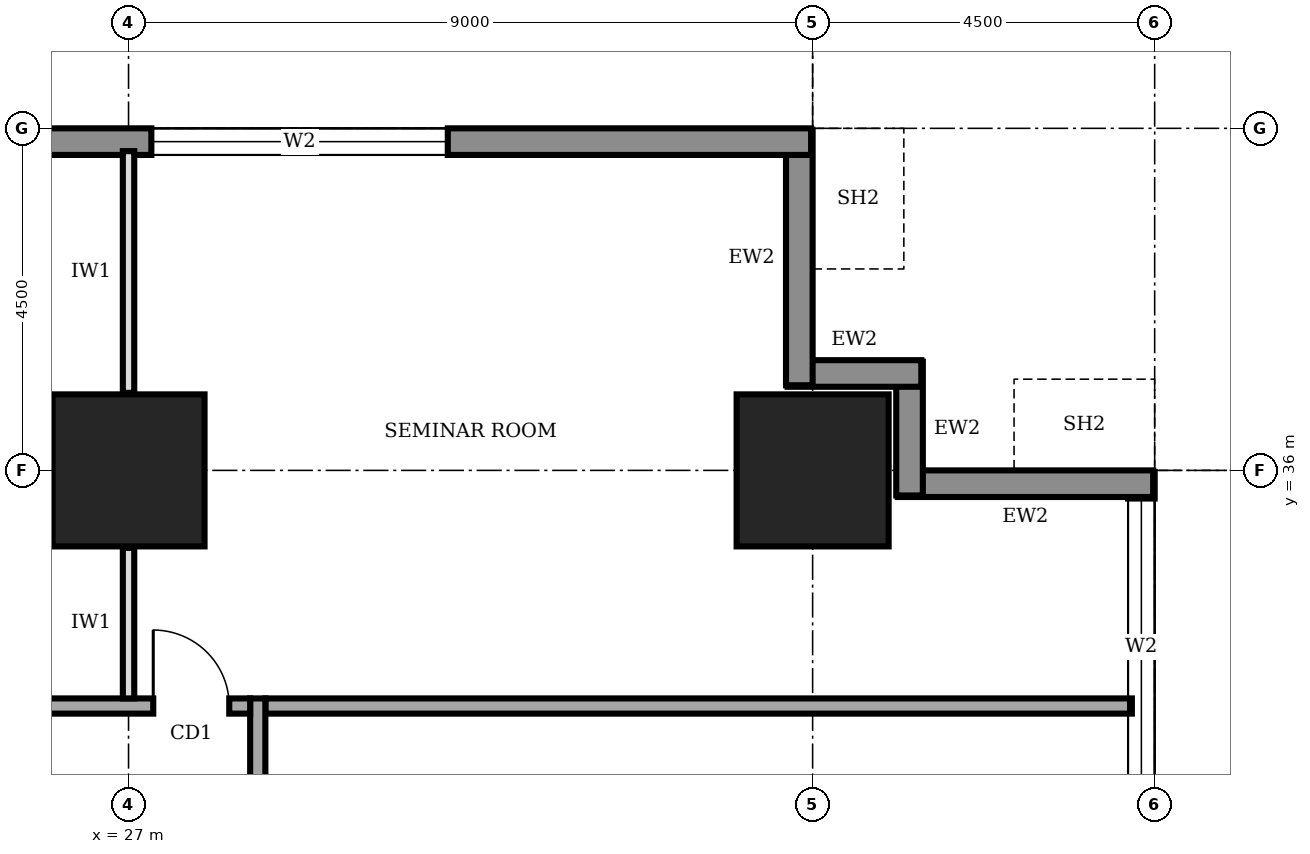
"""IFC4 building model, lengths in metres.
Left out: names, types, materials, properties, quantities, classifications, styles, units other than length and angle.
Written with IfcOpenShell. Run it as: python <this file> out.ifc"""

import sys

from ifc_helpers import new_model, si_unit, direction, frame, frame_2d, origin, origin_2d, place, context, subcontext, project, spatial, rectangle, extrude, element, fill, save


model = new_model("IFC4")
c1 = context("Model", 3, precision=1e-05, world=origin(), true_north=direction((0.0, 1.0)))
c2 = subcontext(c1, "Body", "Model", "MODEL_VIEW")
j1 = project(units=[si_unit("LENGTHUNIT", "METRE"), si_unit("PLANEANGLEUNIT", "RADIAN")], contexts=[c1])
p1 = place(None, origin())
s1 = spatial("IfcSite", under=j1, at=p1, CompositionType="ELEMENT")
p2 = place(p1, origin())
s2 = spatial("IfcBuilding", under=s1, at=p2, CompositionType="ELEMENT")
p3 = place(p2, frame((0.0, 0.0, 49.0)))
s3 = spatial("IfcBuildingStorey", under=s2, at=p3, CompositionType="ELEMENT", Elevation=49.0)
for number, where, z_axis, x_axis in (
    (1, (27.0, 36.0, 0.0), (0.0, 0.0, 1.0), (1.0, 0.0, 0.0)),
    (2, (36.0, 36.0, 0.0), (0.0, 0.0, 1.0), (1.0, 0.0, 0.0)),
):
    element("IfcColumn", number, at=place(p3, frame(where, z_axis=z_axis, x_axis=x_axis)), inside=s3, PredefinedType="COLUMN", context=c2, shape_type="SweptSolid", body=[
        extrude(rectangle(XDim=2.0, YDim=2.0, at=origin_2d()), origin(), (0.0, 0.0, 1.0), 4.0),
    ])
p4 = place(p3, frame((40.325, 4.52, 0.0), z_axis=(0.0, 0.0, 1.0), x_axis=(0.0, 1.0, 0.0)))
e3 = element("IfcWall", 3, at=p4, inside=s3, PredefinedType="STANDARD", context=c2, shape_type="SweptSolid", body=[
    extrude(rectangle(XDim=31.46, YDim=0.35, at=frame_2d((15.73, 0.0))), origin(), (0.0, 0.0, 1.0), 3.75),
])
p5 = place(p4, frame((4.78, 0.0, 0.6)))
e4 = element("IfcOpeningElement", 4, at=p5, cuts=e3, PredefinedType="OPENING", context=c2, shape_type="SweptSolid", body=[
    extrude(rectangle(XDim=3.9, YDim=2.6, at=frame_2d((1.95, 1.3))), frame((0.0, 0.185, 0.0), z_axis=(0.0, -1.0, 0.0), x_axis=(1.0, 0.0, 0.0)), (0.0, 0.0, 1.0), 0.37),
])
p6 = place(p4, frame((9.28, 0.0, 0.6)))
e5 = element("IfcOpeningElement", 5, at=p6, cuts=e3, PredefinedType="OPENING", context=c2, shape_type="SweptSolid", body=[
    extrude(rectangle(XDim=3.9, YDim=2.6, at=frame_2d((1.95, 1.3))), frame((0.0, 0.185, 0.0), z_axis=(0.0, -1.0, 0.0), x_axis=(1.0, 0.0, 0.0)), (0.0, 0.0, 1.0), 0.37),
])
p7 = place(p4, frame((13.78, 0.0, 0.6)))
e6 = element("IfcOpeningElement", 6, at=p7, cuts=e3, PredefinedType="OPENING", context=c2, shape_type="SweptSolid", body=[
    extrude(rectangle(XDim=3.9, YDim=2.6, at=frame_2d((1.95, 1.3))), frame((0.0, 0.185, 0.0), z_axis=(0.0, -1.0, 0.0), x_axis=(1.0, 0.0, 0.0)), (0.0, 0.0, 1.0), 0.37),
])
p8 = place(p4, frame((18.28, 0.0, 0.6)))
e7 = element("IfcOpeningElement", 7, at=p8, cuts=e3, PredefinedType="OPENING", context=c2, shape_type="SweptSolid", body=[
    extrude(rectangle(XDim=3.9, YDim=2.6, at=frame_2d((1.95, 1.3))), frame((0.0, 0.185, 0.0), z_axis=(0.0, -1.0, 0.0), x_axis=(1.0, 0.0, 0.0)), (0.0, 0.0, 1.0), 0.37),
])
p9 = place(p4, frame((22.78, 0.0, 0.6)))
e8 = element("IfcOpeningElement", 8, at=p9, cuts=e3, PredefinedType="OPENING", context=c2, shape_type="SweptSolid", body=[
    extrude(rectangle(XDim=3.9, YDim=2.6, at=frame_2d((1.95, 1.3))), frame((0.0, 0.185, 0.0), z_axis=(0.0, -1.0, 0.0), x_axis=(1.0, 0.0, 0.0)), (0.0, 0.0, 1.0), 0.37),
])
p10 = place(p4, frame((27.21, 0.0, 0.6)))
e9 = element("IfcOpeningElement", 9, at=p10, cuts=e3, PredefinedType="OPENING", context=c2, shape_type="SweptSolid", body=[
    extrude(rectangle(XDim=3.9, YDim=2.6, at=frame_2d((1.95, 1.3))), frame((0.0, 0.185, 0.0), z_axis=(0.0, -1.0, 0.0), x_axis=(1.0, 0.0, 0.0)), (0.0, 0.0, 1.0), 0.37),
])
p11 = place(p3, frame((40.48, 35.825, 0.0), z_axis=(0.0, 0.0, 1.0), x_axis=(-1.0, 0.0, 0.0)))
e10 = element("IfcWall", 10, at=p11, inside=s3, PredefinedType="STANDARD", context=c2, shape_type="SweptSolid", body=[
    extrude(rectangle(XDim=3.36, YDim=0.35, at=frame_2d((1.68, 0.0))), origin(), (0.0, 0.0, 1.0), 2.85),
])
for number, where, z_axis, x_axis in (
    (11, (37.275, 35.67, 0.0), (0.0, 0.0, 1.0), (0.0, 1.0, 0.0)),
    (12, (37.43, 37.275, 0.0), (0.0, 0.0, 1.0), (-1.0, 0.0, 0.0)),
):
    element("IfcWall", number, at=place(p3, frame(where, z_axis=z_axis, x_axis=x_axis)), inside=s3, PredefinedType="STANDARD", context=c2, shape_type="SweptSolid", body=[
        extrude(rectangle(XDim=1.76, YDim=0.35, at=frame_2d((0.88, 0.0))), origin(), (0.0, 0.0, 1.0), 3.75),
    ])
p12 = place(p3, frame((35.825, 37.12, 0.0), z_axis=(0.0, 0.0, 1.0), x_axis=(0.0, 1.0, 0.0)))
e13 = element("IfcWall", 13, at=p12, inside=s3, PredefinedType="STANDARD", context=c2, shape_type="SweptSolid", body=[
    extrude(rectangle(XDim=3.36, YDim=0.35, at=frame_2d((1.68, 0.0))), origin(), (0.0, 0.0, 1.0), 2.85),
])
p13 = place(p3, frame((35.98, 40.325, 0.0), z_axis=(0.0, 0.0, 1.0), x_axis=(-1.0, 0.0, 0.0)))
e14 = element("IfcWall", 14, at=p13, inside=s3, PredefinedType="STANDARD", context=c2, shape_type="SweptSolid", body=[
    extrude(rectangle(XDim=31.46, YDim=0.35, at=frame_2d((15.73, 0.0))), origin(), (0.0, 0.0, 1.0), 3.75),
])
p14 = place(p13, frame((27.21, 0.0, 0.6)))
e15 = element("IfcOpeningElement", 15, at=p14, cuts=e14, PredefinedType="OPENING", context=c2, shape_type="SweptSolid", body=[
    extrude(rectangle(XDim=3.9, YDim=2.6, at=frame_2d((1.95, 1.3))), frame((0.0, 0.185, 0.0), z_axis=(0.0, -1.0, 0.0), x_axis=(1.0, 0.0, 0.0)), (0.0, 0.0, 1.0), 0.37),
])
p15 = place(p13, frame((22.78, 0.0, 0.6)))
e16 = element("IfcOpeningElement", 16, at=p15, cuts=e14, PredefinedType="OPENING", context=c2, shape_type="SweptSolid", body=[
    extrude(rectangle(XDim=3.9, YDim=2.6, at=frame_2d((1.95, 1.3))), frame((0.0, 0.185, 0.0), z_axis=(0.0, -1.0, 0.0), x_axis=(1.0, 0.0, 0.0)), (0.0, 0.0, 1.0), 0.37),
])
p16 = place(p13, frame((4.78, 0.0, 0.6)))
e17 = element("IfcOpeningElement", 17, at=p16, cuts=e14, PredefinedType="OPENING", context=c2, shape_type="SweptSolid", body=[
    extrude(rectangle(XDim=3.9, YDim=2.6, at=frame_2d((1.95, 1.3))), frame((0.0, 0.185, 0.0), z_axis=(0.0, -1.0, 0.0), x_axis=(1.0, 0.0, 0.0)), (0.0, 0.0, 1.0), 0.37),
])
p17 = place(p3, frame((28.7, 9.2, 0.0), z_axis=(0.0, 0.0, 1.0), x_axis=(0.0, 1.0, 0.0)))
e18 = element("IfcWall", 18, at=p17, inside=s3, PredefinedType="SOLIDWALL", context=c2, shape_type="SweptSolid", body=[
    extrude(rectangle(XDim=23.8, YDim=0.2, at=frame_2d((11.9, 0.0))), origin(), (0.0, 0.0, 1.0), 3.75),
])
p18 = place(p17, frame((3.4, 0.0, 0.0)))
e19 = element("IfcOpeningElement", 19, at=p18, cuts=e18, PredefinedType="OPENING", context=c2, shape_type="SweptSolid", body=[
    extrude(rectangle(XDim=1.8, YDim=2.1, at=frame_2d((0.9, 1.05))), frame((0.0, 0.11, 0.0), z_axis=(0.0, -1.0, 0.0), x_axis=(1.0, 0.0, 0.0)), (0.0, 0.0, 1.0), 0.22),
])
p19 = place(p17, frame((10.55, 0.0, 0.0)))
e20 = element("IfcOpeningElement", 20, at=p19, cuts=e18, PredefinedType="OPENING", context=c2, shape_type="SweptSolid", body=[
    extrude(rectangle(XDim=1.0, YDim=2.1, at=frame_2d((0.5, 1.05))), frame((0.0, 0.11, 0.0), z_axis=(0.0, -1.0, 0.0), x_axis=(1.0, 0.0, 0.0)), (0.0, 0.0, 1.0), 0.22),
])
p20 = place(p17, frame((17.65, 0.0, 0.0)))
e21 = element("IfcOpeningElement", 21, at=p20, cuts=e18, PredefinedType="OPENING", context=c2, shape_type="SweptSolid", body=[
    extrude(rectangle(XDim=1.8, YDim=2.1, at=frame_2d((0.9, 1.05))), frame((0.0, 0.11, 0.0), z_axis=(0.0, -1.0, 0.0), x_axis=(1.0, 0.0, 0.0)), (0.0, 0.0, 1.0), 0.22),
])
p21 = place(p3, frame((28.6, 32.9, 0.0), z_axis=(0.0, 0.0, 1.0), x_axis=(-1.0, 0.0, 0.0)))
e22 = element("IfcWall", 22, at=p21, inside=s3, PredefinedType="SOLIDWALL", context=c2, shape_type="SweptSolid", body=[
    extrude(rectangle(XDim=16.9, YDim=0.2, at=frame_2d((8.45, 0.0))), origin(), (0.0, 0.0, 1.0), 3.75),
])
p22 = place(p21, frame((15.425, 0.0, 0.0)))
e23 = element("IfcOpeningElement", 23, at=p22, cuts=e22, PredefinedType="OPENING", context=c2, shape_type="SweptSolid", body=[
    extrude(rectangle(XDim=1.0, YDim=2.1, at=frame_2d((0.5, 1.05))), frame((0.0, 0.11, 0.0), z_axis=(0.0, -1.0, 0.0), x_axis=(1.0, 0.0, 0.0)), (0.0, 0.0, 1.0), 0.22),
])
p23 = place(p21, frame((12.35, 0.0, 0.0)))
e24 = element("IfcOpeningElement", 24, at=p23, cuts=e22, PredefinedType="OPENING", context=c2, shape_type="SweptSolid", body=[
    extrude(rectangle(XDim=1.0, YDim=2.1, at=frame_2d((0.5, 1.05))), frame((0.0, 0.11, 0.0), z_axis=(0.0, -1.0, 0.0), x_axis=(1.0, 0.0, 0.0)), (0.0, 0.0, 1.0), 0.22),
])
p24 = place(p21, frame((5.6, 0.0, 0.0)))
e25 = element("IfcOpeningElement", 25, at=p24, cuts=e22, PredefinedType="OPENING", context=c2, shape_type="SweptSolid", body=[
    extrude(rectangle(XDim=1.0, YDim=2.1, at=frame_2d((0.5, 1.05))), frame((0.0, 0.11, 0.0), z_axis=(0.0, -1.0, 0.0), x_axis=(1.0, 0.0, 0.0)), (0.0, 0.0, 1.0), 0.22),
])
p25 = place(p21, frame((0.275, 0.0, 0.0)))
e26 = element("IfcOpeningElement", 26, at=p25, cuts=e22, PredefinedType="OPENING", context=c2, shape_type="SweptSolid", body=[
    extrude(rectangle(XDim=1.0, YDim=2.1, at=frame_2d((0.5, 1.05))), frame((0.0, 0.11, 0.0), z_axis=(0.0, -1.0, 0.0), x_axis=(1.0, 0.0, 0.0)), (0.0, 0.0, 1.0), 0.22),
])
p26 = place(p3, frame((28.8, 32.9, 0.0), z_axis=(0.0, 0.0, 1.0), x_axis=(1.0, 0.0, 0.0)))
e27 = element("IfcWall", 27, at=p26, inside=s3, PredefinedType="SOLIDWALL", context=c2, shape_type="SweptSolid", body=[
    extrude(rectangle(XDim=11.4, YDim=0.2, at=frame_2d((5.7, 0.0))), origin(), (0.0, 0.0, 1.0), 3.75),
])
p27 = place(p3, frame((27.0, 33.0, 0.0), z_axis=(0.0, 0.0, 1.0), x_axis=(0.0, 1.0, 0.0)))
e28 = element("IfcWall", 28, at=p27, inside=s3, PredefinedType="PARTITIONING", context=c2, shape_type="SweptSolid", body=[
    extrude(rectangle(XDim=1.98, YDim=0.15, at=frame_2d((0.99, 0.0))), origin(), (0.0, 0.0, 1.0), 2.85),
])
p28 = place(p3, frame((27.0, 37.02, 0.0), z_axis=(0.0, 0.0, 1.0), x_axis=(0.0, 1.0, 0.0)))
e29 = element("IfcWall", 29, at=p28, inside=s3, PredefinedType="PARTITIONING", context=c2, shape_type="SweptSolid", body=[
    extrude(rectangle(XDim=3.18, YDim=0.15, at=frame_2d((1.59, 0.0))), origin(), (0.0, 0.0, 1.0), 2.85),
])
p29 = place(p10, origin())
e30 = element("IfcWindow", 30, at=p29, inside=s3, PartitioningType="SINGLE_PANEL", PredefinedType="WINDOW", context=c2, shape_type="SweptSolid", body=[
    extrude(rectangle(XDim=3.9, YDim=2.6, at=frame_2d((1.95, 1.3))), frame((0.0, 0.03, 0.0), z_axis=(0.0, -1.0, 0.0), x_axis=(1.0, 0.0, 0.0)), (0.0, 0.0, 1.0), 0.06),
])
fill(e9, e30)
p30 = place(p16, origin())
e31 = element("IfcWindow", 31, at=p30, inside=s3, PartitioningType="SINGLE_PANEL", PredefinedType="WINDOW", context=c2, shape_type="SweptSolid", body=[
    extrude(rectangle(XDim=3.9, YDim=2.6, at=frame_2d((1.95, 1.3))), frame((0.0, 0.03, 0.0), z_axis=(0.0, -1.0, 0.0), x_axis=(1.0, 0.0, 0.0)), (0.0, 0.0, 1.0), 0.06),
])
fill(e17, e31)
p31 = place(p25, frame((1.0, 0.0, 0.0), z_axis=(0.0, 0.0, 1.0), x_axis=(-1.0, 0.0, 0.0)))
e32 = element("IfcDoor", 32, at=p31, inside=s3, OperationType="SINGLE_SWING_LEFT", PredefinedType="DOOR", context=c2, shape_type="SweptSolid", body=[
    extrude(rectangle(XDim=1.0, YDim=2.1, at=frame_2d((0.5, 1.05))), frame((0.0, 0.025, 0.0), z_axis=(0.0, -1.0, 0.0), x_axis=(1.0, 0.0, 0.0)), (0.0, 0.0, 1.0), 0.05),
])
fill(e26, e32)
save(model, sys.argv[1])
